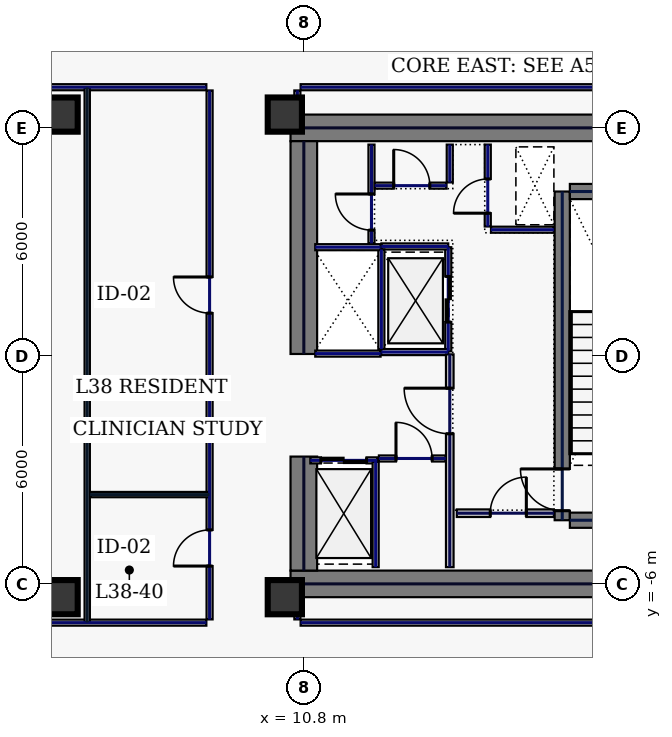
"""IFC4 building model, lengths in metres.
Left out: names, types, materials, properties, quantities, classifications, styles, units other than length and angle.
Written with IfcOpenShell. Run it as: python <this file> out.ifc"""

import sys

from ifc_helpers import new_model, si_unit, direction, frame, frame_2d, origin, origin_2d, place, context, subcontext, project, spatial, rectangle, hollow_rectangle, extrude, element, fill, save


model = new_model("IFC4")
c1 = context("Model", 3, precision=1e-05, world=origin(), true_north=direction((0.0, 1.0)))
c2 = subcontext(c1, "Body", "Model", "MODEL_VIEW")
j1 = project(units=[si_unit("LENGTHUNIT", "METRE"), si_unit("PLANEANGLEUNIT", "RADIAN")], contexts=[c1])
p1 = place(None, origin())
s1 = spatial("IfcSite", under=j1, at=p1, CompositionType="ELEMENT")
p2 = place(p1, origin())
s2 = spatial("IfcBuilding", under=s1, at=p2, CompositionType="ELEMENT")
p3 = place(p2, frame((0.0, 0.0, 168.2)))
s3 = spatial("IfcBuildingStorey", under=s2, at=p3, CompositionType="ELEMENT", Elevation=168.2)
for number, where, z_axis, x_axis in (
    (1, (10.45, 6.0, 0.0), (0.0, 0.0, 1.0), (1.0, 0.0, 0.0)),
    (2, (10.45, -6.0, 0.0), (0.0, 0.0, 1.0), (1.0, 0.0, 0.0)),
):
    element("IfcWall", number, at=place(p3, frame(where, z_axis=z_axis, x_axis=x_axis)), inside=s3, PredefinedType="SHEAR", context=c2, shape_type="SweptSolid", body=[
        extrude(rectangle(XDim=11.55, YDim=0.7, at=frame_2d((5.775, 0.0))), origin(), (0.0, 0.0, 1.0), 3.74),
    ])
p4 = place(p3, frame((10.8, -5.65, 0.0), z_axis=(0.0, 0.0, 1.0), x_axis=(0.0, 1.0, 0.0)))
e3 = element("IfcWall", 3, at=p4, inside=s3, PredefinedType="SHEAR", context=c2, shape_type="SweptSolid", body=[
    extrude(rectangle(XDim=3.0, YDim=0.7, at=frame_2d((1.5, 0.0))), origin(), (0.0, 0.0, 1.0), 3.74),
])
p5 = place(p3, frame((10.8, 0.05, 0.0), z_axis=(0.0, 0.0, 1.0), x_axis=(0.0, 1.0, 0.0)))
e4 = element("IfcWall", 4, at=p5, inside=s3, PredefinedType="SHEAR", context=c2, shape_type="SweptSolid", body=[
    extrude(rectangle(XDim=5.6, YDim=0.7, at=frame_2d((2.8, 0.0))), origin(), (0.0, 0.0, 1.0), 3.74),
])
p6 = place(p3, frame((17.6, -4.325, 0.0), z_axis=(0.0, 0.0, 1.0), x_axis=(0.0, 1.0, 0.0)))
e5 = element("IfcWall", 5, at=p6, inside=s3, PredefinedType="SHEAR", context=c2, shape_type="SweptSolid", body=[
    extrude(rectangle(XDim=8.65, YDim=0.4, at=frame_2d((4.325, 0.0))), origin(), (0.0, 0.0, 1.0), 3.74),
])
p7 = place(p6, frame((0.25, 0.0, 0.0)))
e6 = element("IfcOpeningElement", 6, at=p7, cuts=e5, PredefinedType="OPENING", context=c2, shape_type="SweptSolid", body=[
    extrude(rectangle(XDim=1.1, YDim=2.2, at=frame_2d((0.55, 1.1))), frame((0.0, 0.21, 0.0), z_axis=(0.0, -1.0, 0.0), x_axis=(1.0, 0.0, 0.0)), (0.0, 0.0, 1.0), 0.42),
])
for number, where, z_axis, x_axis in (
    (7, (17.8, -4.325, 0.0), (0.0, 0.0, 1.0), (1.0, 0.0, 0.0)),
    (8, (17.8, 4.325, 0.0), (0.0, 0.0, 1.0), (1.0, 0.0, 0.0)),
):
    element("IfcWall", number, at=place(p3, frame(where, z_axis=z_axis, x_axis=x_axis)), inside=s3, PredefinedType="SHEAR", context=c2, shape_type="SweptSolid", body=[
        extrude(rectangle(XDim=3.4, YDim=0.4, at=frame_2d((1.7, 0.0))), origin(), (0.0, 0.0, 1.0), 3.74),
    ])
for number, where, z_axis, x_axis in (
    (9, (10.3, -6.35, 0.0), (0.0, 0.0, 1.0), (1.0, 0.0, 0.0)),
    (10, (10.3, 6.35, 0.0), (0.0, 0.0, 1.0), (1.0, 0.0, 0.0)),
    (11, (4.4, -6.35, 0.0), (0.0, 0.0, 1.0), (1.0, 0.0, 0.0)),
    (12, (4.4, 6.35, 0.0), (0.0, 0.0, 1.0), (1.0, 0.0, 0.0)),
):
    element("IfcColumn", number, at=place(p3, frame(where, z_axis=z_axis, x_axis=x_axis)), inside=s3, PredefinedType="COLUMN", context=c2, shape_type="SweptSolid", body=[
        extrude(hollow_rectangle(XDim=0.9, YDim=0.9, WallThickness=0.04, at=origin_2d()), origin(), (0.0, 0.0, 1.0), 3.74),
    ])
p8 = place(p3, frame((14.6, 0.12, 0.0), z_axis=(0.0, 0.0, 1.0), x_axis=(0.0, 1.0, 0.0)))
e13 = element("IfcWall", 13, at=p8, inside=s3, PredefinedType="PARTITIONING", context=c2, shape_type="SweptSolid", body=[
    extrude(rectangle(XDim=2.74, YDim=0.16, at=frame_2d((1.37, 0.0))), origin(), (0.0, 0.0, 1.0), 3.74),
])
p9 = place(p8, frame((0.77, 0.0, 0.0)))
e14 = element("IfcOpeningElement", 14, at=p9, cuts=e13, PredefinedType="OPENING", context=c2, shape_type="SweptSolid", body=[
    extrude(rectangle(XDim=1.2, YDim=2.2, at=frame_2d((0.6, 1.1))), frame((0.0, 0.09, 0.0), z_axis=(0.0, -1.0, 0.0), x_axis=(1.0, 0.0, 0.0)), (0.0, 0.0, 1.0), 0.18),
])
for number, where, z_axis, x_axis in (
    (15, (12.84, 0.1, 0.0), (0.0, 0.0, 1.0), (1.0, 0.0, 0.0)),
    (16, (12.84, 2.88, 0.0), (0.0, 0.0, 1.0), (1.0, 0.0, 0.0)),
):
    element("IfcWall", number, at=place(p3, frame(where, z_axis=z_axis, x_axis=x_axis)), inside=s3, PredefinedType="PARTITIONING", context=c2, shape_type="SweptSolid", body=[
        extrude(rectangle(XDim=1.76, YDim=0.16, at=frame_2d((0.88, 0.0))), origin(), (0.0, 0.0, 1.0), 3.74),
    ])
p10 = place(p3, frame((12.84, 0.18, 0.0), z_axis=(0.0, 0.0, 1.0), x_axis=(0.0, 1.0, 0.0)))
e17 = element("IfcWall", 17, at=p10, inside=s3, PredefinedType="PARTITIONING", context=c2, shape_type="SweptSolid", body=[
    extrude(rectangle(XDim=2.62, YDim=0.16, at=frame_2d((1.31, 0.0))), origin(), (0.0, 0.0, 1.0), 3.74),
])
p11 = place(p3, frame((10.97, -2.75, 0.0), z_axis=(0.0, 0.0, 1.0), x_axis=(1.0, 0.0, 0.0)))
e18 = element("IfcWall", 18, at=p11, inside=s3, PredefinedType="PARTITIONING", context=c2, shape_type="SweptSolid", body=[
    extrude(rectangle(XDim=1.76, YDim=0.16, at=frame_2d((0.88, 0.0))), origin(), (0.0, 0.0, 1.0), 3.74),
])
p12 = place(p11, frame((0.28, 0.0, 0.0)))
e19 = element("IfcOpeningElement", 19, at=p12, cuts=e18, PredefinedType="OPENING", context=c2, shape_type="SweptSolid", body=[
    extrude(rectangle(XDim=1.2, YDim=2.2, at=frame_2d((0.6, 1.1))), frame((0.0, 0.09, 0.0), z_axis=(0.0, -1.0, 0.0), x_axis=(1.0, 0.0, 0.0)), (0.0, 0.0, 1.0), 0.18),
])
for number, where, z_axis, x_axis in (
    (20, (11.1, 0.06, 0.0), (0.0, 0.0, 1.0), (1.0, 0.0, 0.0)),
    (21, (11.1, 2.86, 0.0), (0.0, 0.0, 1.0), (1.0, 0.0, 0.0)),
):
    element("IfcWall", number, at=place(p3, frame(where, z_axis=z_axis, x_axis=x_axis)), inside=s3, PredefinedType="PARTITIONING", context=c2, shape_type="SweptSolid", body=[
        extrude(rectangle(XDim=1.72, YDim=0.16, at=frame_2d((0.86, 0.0))), origin(), (0.0, 0.0, 1.0), 3.74),
    ])
p13 = place(p3, frame((15.64, 3.405, 0.0), z_axis=(0.0, 0.0, 1.0), x_axis=(0.0, 1.0, 0.0)))
e22 = element("IfcWall", 22, at=p13, inside=s3, PredefinedType="PARTITIONING", context=c2, shape_type="SweptSolid", body=[
    extrude(rectangle(XDim=2.155, YDim=0.16, at=frame_2d((1.078, 0.0))), origin(), (0.0, 0.0, 1.0), 3.74),
])
p14 = place(p13, frame((0.35, 0.0, 0.0)))
e23 = element("IfcOpeningElement", 23, at=p14, cuts=e22, PredefinedType="OPENING", context=c2, shape_type="SweptSolid", body=[
    extrude(rectangle(XDim=0.9, YDim=2.2, at=frame_2d((0.45, 1.1))), frame((0.0, 0.09, 0.0), z_axis=(0.0, -1.0, 0.0), x_axis=(1.0, 0.0, 0.0)), (0.0, 0.0, 1.0), 0.18),
])
p15 = place(p3, frame((15.725, 3.32, 0.0), z_axis=(0.0, 0.0, 1.0), x_axis=(1.0, 0.0, 0.0)))
e24 = element("IfcWall", 24, at=p15, inside=s3, PredefinedType="PARTITIONING", context=c2, shape_type="SweptSolid", body=[
    extrude(rectangle(XDim=1.655, YDim=0.16, at=frame_2d((0.827, 0.0))), origin(), (0.0, 0.0, 1.0), 3.74),
])
p16 = place(p3, frame((14.825, -4.14, 0.0), z_axis=(0.0, 0.0, 1.0), x_axis=(1.0, 0.0, 0.0)))
e25 = element("IfcWall", 25, at=p16, inside=s3, PredefinedType="SOLIDWALL", context=c2, shape_type="SweptSolid", body=[
    extrude(rectangle(XDim=2.555, YDim=0.2, at=frame_2d((1.277, 0.0))), origin(), (0.0, 0.0, 1.0), 3.74),
])
p17 = place(p16, frame((0.88, 0.0, 0.0)))
e26 = element("IfcOpeningElement", 26, at=p17, cuts=e25, PredefinedType="OPENING", context=c2, shape_type="SweptSolid", body=[
    extrude(rectangle(XDim=0.95, YDim=2.2, at=frame_2d((0.475, 1.1))), frame((0.0, 0.11, 0.0), z_axis=(0.0, -1.0, 0.0), x_axis=(1.0, 0.0, 0.0)), (0.0, 0.0, 1.0), 0.22),
])
p18 = place(p3, frame((12.775, -2.7, 0.0), z_axis=(0.0, 0.0, 1.0), x_axis=(1.0, 0.0, 0.0)))
e27 = element("IfcWall", 27, at=p18, inside=s3, PredefinedType="PARTITIONING", context=c2, shape_type="SweptSolid", body=[
    extrude(rectangle(XDim=1.76, YDim=0.16, at=frame_2d((0.88, 0.0))), origin(), (0.0, 0.0, 1.0), 3.74),
])
p19 = place(p18, frame((0.45, 0.0, 0.0)))
e28 = element("IfcOpeningElement", 28, at=p19, cuts=e27, PredefinedType="OPENING", context=c2, shape_type="SweptSolid", body=[
    extrude(rectangle(XDim=0.95, YDim=2.2, at=frame_2d((0.475, 1.1))), frame((0.0, 0.09, 0.0), z_axis=(0.0, -1.0, 0.0), x_axis=(1.0, 0.0, 0.0)), (0.0, 0.0, 1.0), 0.18),
])
p20 = place(p3, frame((12.69, -5.56, 0.0), z_axis=(0.0, 0.0, 1.0), x_axis=(0.0, 1.0, 0.0)))
e29 = element("IfcWall", 29, at=p20, inside=s3, PredefinedType="PARTITIONING", context=c2, shape_type="SweptSolid", body=[
    extrude(rectangle(XDim=2.775, YDim=0.16, at=frame_2d((1.388, 0.0))), origin(), (0.0, 0.0, 1.0), 3.74),
])
p21 = place(p3, frame((12.58, 2.96, 0.0), z_axis=(0.0, 0.0, 1.0), x_axis=(0.0, 1.0, 0.0)))
e30 = element("IfcWall", 30, at=p21, inside=s3, PredefinedType="PARTITIONING", context=c2, shape_type="SweptSolid", body=[
    extrude(rectangle(XDim=2.6, YDim=0.16, at=frame_2d((1.3, 0.0))), origin(), (0.0, 0.0, 1.0), 3.74),
])
p22 = place(p21, frame((0.35, 0.0, 0.0)))
e31 = element("IfcOpeningElement", 31, at=p22, cuts=e30, PredefinedType="OPENING", context=c2, shape_type="SweptSolid", body=[
    extrude(rectangle(XDim=0.95, YDim=2.2, at=frame_2d((0.475, 1.1))), frame((0.0, 0.09, 0.0), z_axis=(0.0, -1.0, 0.0), x_axis=(1.0, 0.0, 0.0)), (0.0, 0.0, 1.0), 0.18),
])
p23 = place(p3, frame((12.665, 4.48, 0.0), z_axis=(0.0, 0.0, 1.0), x_axis=(1.0, 0.0, 0.0)))
e32 = element("IfcWall", 32, at=p23, inside=s3, PredefinedType="PARTITIONING", context=c2, shape_type="SweptSolid", body=[
    extrude(rectangle(XDim=1.89, YDim=0.16, at=frame_2d((0.945, 0.0))), origin(), (0.0, 0.0, 1.0), 3.74),
])
p24 = place(p23, frame((0.5, 0.0, 0.0)))
e33 = element("IfcOpeningElement", 33, at=p24, cuts=e32, PredefinedType="OPENING", context=c2, shape_type="SweptSolid", body=[
    extrude(rectangle(XDim=0.95, YDim=2.2, at=frame_2d((0.475, 1.1))), frame((0.0, 0.09, 0.0), z_axis=(0.0, -1.0, 0.0), x_axis=(1.0, 0.0, 0.0)), (0.0, 0.0, 1.0), 0.18),
])
p25 = place(p3, frame((14.64, 4.565, 0.0), z_axis=(0.0, 0.0, 1.0), x_axis=(0.0, 1.0, 0.0)))
e34 = element("IfcWall", 34, at=p25, inside=s3, PredefinedType="PARTITIONING", context=c2, shape_type="SweptSolid", body=[
    extrude(rectangle(XDim=0.995, YDim=0.16, at=frame_2d((0.498, 0.0))), origin(), (0.0, 0.0, 1.0), 3.74),
])
p26 = place(p3, frame((14.64, -5.56, 0.0), z_axis=(0.0, 0.0, 1.0), x_axis=(0.0, 1.0, 0.0)))
e35 = element("IfcWall", 35, at=p26, inside=s3, PredefinedType="SOLIDWALL", context=c2, shape_type="SweptSolid", body=[
    extrude(rectangle(XDim=5.6, YDim=0.2, at=frame_2d((2.8, 0.0))), origin(), (0.0, 0.0, 1.0), 3.74),
])
p27 = place(p26, frame((3.51, 0.0, 0.0)))
e36 = element("IfcOpeningElement", 36, at=p27, cuts=e35, PredefinedType="OPENING", context=c2, shape_type="SweptSolid", body=[
    extrude(rectangle(XDim=1.2, YDim=2.2, at=frame_2d((0.6, 1.1))), frame((0.0, 0.11, 0.0), z_axis=(0.0, -1.0, 0.0), x_axis=(1.0, 0.0, 0.0)), (0.0, 0.0, 1.0), 0.22),
])
p28 = place(p3, frame((24.965, 7.07, 0.0), z_axis=(0.0, 0.0, 1.0), x_axis=(-1.0, 0.0, 0.0)))
e37 = element("IfcWall", 37, at=p28, inside=s3, PredefinedType="PARTITIONING", context=c2, shape_type="SweptSolid", body=[
    extrude(rectangle(XDim=14.25, YDim=0.16, at=frame_2d((7.125, 0.0))), origin(), (0.0, 0.0, 1.0), 3.74),
])
p29 = place(p3, frame((10.63, 6.985, 0.0), z_axis=(0.0, 0.0, 1.0), x_axis=(0.0, -1.0, 0.0)))
e38 = element("IfcWall", 38, at=p29, inside=s3, PredefinedType="PARTITIONING", context=c2, shape_type="SweptSolid", body=[
    extrude(rectangle(XDim=0.565, YDim=0.16, at=frame_2d((0.283, 0.0))), origin(), (0.0, 0.0, 1.0), 3.74),
])
p30 = place(p3, frame((10.63, -6.42, 0.0), z_axis=(0.0, 0.0, 1.0), x_axis=(0.0, -1.0, 0.0)))
e39 = element("IfcWall", 39, at=p30, inside=s3, PredefinedType="PARTITIONING", context=c2, shape_type="SweptSolid", body=[
    extrude(rectangle(XDim=0.515, YDim=0.16, at=frame_2d((0.258, 0.0))), origin(), (0.0, 0.0, 1.0), 3.74),
])
p31 = place(p3, frame((10.715, -7.02, 0.0), z_axis=(0.0, 0.0, 1.0), x_axis=(1.0, 0.0, 0.0)))
e40 = element("IfcWall", 40, at=p31, inside=s3, PredefinedType="PARTITIONING", context=c2, shape_type="SweptSolid", body=[
    extrude(rectangle(XDim=14.25, YDim=0.16, at=frame_2d((7.125, 0.0))), origin(), (0.0, 0.0, 1.0), 3.74),
])
for number, where, z_axis, x_axis in (
    (41, (8.235, 7.07, 0.0), (0.0, 0.0, 1.0), (-1.0, 0.0, 0.0)),
    (42, (1.415, -7.02, 0.0), (0.0, 0.0, 1.0), (1.0, 0.0, 0.0)),
):
    element("IfcWall", number, at=place(p3, frame(where, z_axis=z_axis, x_axis=x_axis)), inside=s3, PredefinedType="PARTITIONING", context=c2, shape_type="SweptSolid", body=[
        extrude(rectangle(XDim=6.82, YDim=0.16, at=frame_2d((3.41, 0.0))), origin(), (0.0, 0.0, 1.0), 3.74),
    ])
p32 = place(p3, frame((8.32, -6.935, 0.0), z_axis=(0.0, 0.0, 1.0), x_axis=(0.0, 1.0, 0.0)))
e43 = element("IfcWall", 43, at=p32, inside=s3, PredefinedType="PARTITIONING", context=c2, shape_type="SweptSolid", body=[
    extrude(rectangle(XDim=13.92, YDim=0.16, at=frame_2d((6.96, 0.0))), origin(), (0.0, 0.0, 1.0), 3.74),
])
p33 = place(p32, frame((1.404, 0.0, 0.0)))
e44 = element("IfcOpeningElement", 44, at=p33, cuts=e43, PredefinedType="OPENING", context=c2, shape_type="SweptSolid", body=[
    extrude(rectangle(XDim=0.95, YDim=2.2, at=frame_2d((0.475, 1.1))), frame((0.0, 0.09, 0.0), z_axis=(0.0, -1.0, 0.0), x_axis=(1.0, 0.0, 0.0)), (0.0, 0.0, 1.0), 0.18),
])
p34 = place(p32, frame((8.061, 0.0, 0.0)))
e45 = element("IfcOpeningElement", 45, at=p34, cuts=e43, PredefinedType="OPENING", context=c2, shape_type="SweptSolid", body=[
    extrude(rectangle(XDim=0.95, YDim=2.2, at=frame_2d((0.475, 1.1))), frame((0.0, 0.09, 0.0), z_axis=(0.0, -1.0, 0.0), x_axis=(1.0, 0.0, 0.0)), (0.0, 0.0, 1.0), 0.18),
])
p35 = place(p3, frame((5.1, -7.015, 0.0), z_axis=(0.0, 0.0, 1.0), x_axis=(0.0, 1.0, 0.0)))
e46 = element("IfcWall", 46, at=p35, inside=s3, PredefinedType="PARTITIONING", context=c2, shape_type="SweptSolid", body=[
    extrude(rectangle(XDim=14.08, YDim=0.14, at=frame_2d((7.04, 0.0))), origin(), (0.0, 0.0, 1.0), 3.74),
])
p36 = place(p3, frame((5.175, -3.65, 0.0), z_axis=(0.0, 0.0, 1.0), x_axis=(1.0, 0.0, 0.0)))
e47 = element("IfcWall", 47, at=p36, inside=s3, PredefinedType="PARTITIONING", context=c2, shape_type="SweptSolid", body=[
    extrude(rectangle(XDim=3.14, YDim=0.14, at=frame_2d((1.57, 0.0))), origin(), (0.0, 0.0, 1.0), 3.74),
])
p37 = place(p7, origin())
e48 = element("IfcDoor", 48, at=p37, inside=s3, OperationType="SINGLE_SWING_RIGHT", PredefinedType="DOOR", context=c2, shape_type="SweptSolid", body=[
    extrude(rectangle(XDim=1.1, YDim=2.2, at=frame_2d((0.55, 1.1))), frame((0.0, 0.025, 0.0), z_axis=(0.0, -1.0, 0.0), x_axis=(1.0, 0.0, 0.0)), (0.0, 0.0, 1.0), 0.05),
])
fill(e6, e48)
p38 = place(p9, origin())
e49 = element("IfcDoor", 49, at=p38, inside=s3, OperationType="SLIDING_TO_LEFT", PredefinedType="DOOR", context=c2, shape_type="SweptSolid", body=[
    extrude(rectangle(XDim=1.2, YDim=2.2, at=frame_2d((0.6, 1.1))), frame((0.0, 0.025, 0.0), z_axis=(0.0, -1.0, 0.0), x_axis=(1.0, 0.0, 0.0)), (0.0, 0.0, 1.0), 0.05),
])
fill(e14, e49)
p39 = place(p12, origin())
e50 = element("IfcDoor", 50, at=p39, inside=s3, OperationType="SLIDING_TO_LEFT", PredefinedType="DOOR", context=c2, shape_type="SweptSolid", body=[
    extrude(rectangle(XDim=1.2, YDim=2.2, at=frame_2d((0.6, 1.1))), frame((0.0, 0.025, 0.0), z_axis=(0.0, -1.0, 0.0), x_axis=(1.0, 0.0, 0.0)), (0.0, 0.0, 1.0), 0.05),
])
fill(e19, e50)
p40 = place(p14, origin())
e51 = element("IfcDoor", 51, at=p40, inside=s3, OperationType="SINGLE_SWING_LEFT", PredefinedType="DOOR", context=c2, shape_type="SweptSolid", body=[
    extrude(rectangle(XDim=0.9, YDim=2.2, at=frame_2d((0.45, 1.1))), frame((0.0, 0.025, 0.0), z_axis=(0.0, -1.0, 0.0), x_axis=(1.0, 0.0, 0.0)), (0.0, 0.0, 1.0), 0.05),
])
fill(e23, e51)
p41 = place(p17, origin())
e52 = element("IfcDoor", 52, at=p41, inside=s3, OperationType="SINGLE_SWING_RIGHT", PredefinedType="DOOR", context=c2, shape_type="SweptSolid", body=[
    extrude(rectangle(XDim=0.95, YDim=2.2, at=frame_2d((0.475, 1.1))), frame((0.0, 0.025, 0.0), z_axis=(0.0, -1.0, 0.0), x_axis=(1.0, 0.0, 0.0)), (0.0, 0.0, 1.0), 0.05),
])
fill(e26, e52)
p42 = place(p19, origin())
e53 = element("IfcDoor", 53, at=p42, inside=s3, OperationType="SINGLE_SWING_LEFT", PredefinedType="DOOR", context=c2, shape_type="SweptSolid", body=[
    extrude(rectangle(XDim=0.95, YDim=2.2, at=frame_2d((0.475, 1.1))), frame((0.0, 0.025, 0.0), z_axis=(0.0, -1.0, 0.0), x_axis=(1.0, 0.0, 0.0)), (0.0, 0.0, 1.0), 0.05),
])
fill(e28, e53)
p43 = place(p22, origin())
e54 = element("IfcDoor", 54, at=p43, inside=s3, OperationType="SINGLE_SWING_RIGHT", PredefinedType="DOOR", context=c2, shape_type="SweptSolid", body=[
    extrude(rectangle(XDim=0.95, YDim=2.2, at=frame_2d((0.475, 1.1))), frame((0.0, 0.025, 0.0), z_axis=(0.0, -1.0, 0.0), x_axis=(1.0, 0.0, 0.0)), (0.0, 0.0, 1.0), 0.05),
])
fill(e31, e54)
p44 = place(p24, origin())
e55 = element("IfcDoor", 55, at=p44, inside=s3, OperationType="SINGLE_SWING_LEFT", PredefinedType="DOOR", context=c2, shape_type="SweptSolid", body=[
    extrude(rectangle(XDim=0.95, YDim=2.2, at=frame_2d((0.475, 1.1))), frame((0.0, 0.025, 0.0), z_axis=(0.0, -1.0, 0.0), x_axis=(1.0, 0.0, 0.0)), (0.0, 0.0, 1.0), 0.05),
])
fill(e33, e55)
p45 = place(p27, origin())
e56 = element("IfcDoor", 56, at=p45, inside=s3, OperationType="SINGLE_SWING_RIGHT", PredefinedType="DOOR", context=c2, shape_type="SweptSolid", body=[
    extrude(rectangle(XDim=1.2, YDim=2.2, at=frame_2d((0.6, 1.1))), frame((0.0, 0.025, 0.0), z_axis=(0.0, -1.0, 0.0), x_axis=(1.0, 0.0, 0.0)), (0.0, 0.0, 1.0), 0.05),
])
fill(e36, e56)
p46 = place(p33, origin())
e57 = element("IfcDoor", 57, at=p46, inside=s3, OperationType="SINGLE_SWING_LEFT", PredefinedType="DOOR", context=c2, shape_type="SweptSolid", body=[
    extrude(rectangle(XDim=0.95, YDim=2.2, at=frame_2d((0.475, 1.1))), frame((0.0, 0.025, 0.0), z_axis=(0.0, -1.0, 0.0), x_axis=(1.0, 0.0, 0.0)), (0.0, 0.0, 1.0), 0.05),
])
fill(e44, e57)
p47 = place(p34, origin())
e58 = element("IfcDoor", 58, at=p47, inside=s3, OperationType="SINGLE_SWING_RIGHT", PredefinedType="DOOR", context=c2, shape_type="SweptSolid", body=[
    extrude(rectangle(XDim=0.95, YDim=2.2, at=frame_2d((0.475, 1.1))), frame((0.0, 0.025, 0.0), z_axis=(0.0, -1.0, 0.0), x_axis=(1.0, 0.0, 0.0)), (0.0, 0.0, 1.0), 0.05),
])
fill(e45, e58)
save(model, sys.argv[1])
